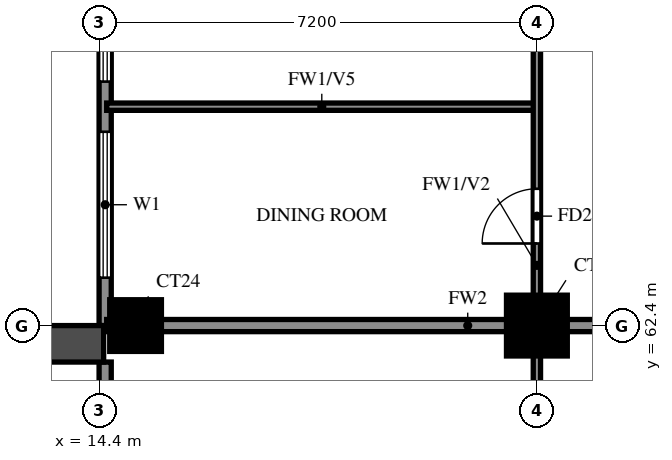
"""IFC4 building model, lengths in metres.
Left out: names, types, materials, properties, quantities, classifications, styles, units other than length and angle.
Written with IfcOpenShell. Run it as: python <this file> out.ifc"""

import sys

from ifc_helpers import new_model, si_unit, direction, frame, frame_2d, origin, origin_2d, place, context, subcontext, project, spatial, rectangle, extrude, source, transform, mapped, element, fill, save


model = new_model("IFC4")
c1 = context("Model", 3, precision=1e-05, world=origin(), true_north=direction((0.0, 1.0)))
c2 = subcontext(c1, "Body", "Model", "MODEL_VIEW")
j1 = project(units=[si_unit("LENGTHUNIT", "METRE"), si_unit("PLANEANGLEUNIT", "RADIAN")], contexts=[c1])
p1 = place(None, origin())
s1 = spatial("IfcSite", under=j1, at=p1, CompositionType="ELEMENT")
p2 = place(p1, origin())
s2 = spatial("IfcBuilding", under=s1, at=p2, CompositionType="ELEMENT")
p3 = place(p2, frame((0.0, 0.0, 143.0)))
s3 = spatial("IfcBuildingStorey", under=s2, at=p3, CompositionType="ELEMENT", Elevation=143.0)
m1 = source(origin(), c2, "Body", "SweptSolid", [
    extrude(rectangle(XDim=0.85, YDim=0.85, at=origin_2d()), origin(), (0.0, 0.0, 1.0), 3.2),
])
p4 = place(p3, frame((15.0, 62.4, 0.0), z_axis=(0.0, 0.0, 1.0), x_axis=(1.0, 0.0, 0.0)))
e1 = element("IfcColumn", 1, at=p4, inside=s3, PredefinedType="COLUMN", context=c2, shape_type="MappedRepresentation", body=[
    mapped(m1, transform((0.0, 0.0, 0.0))),
])
m2 = source(origin(), c2, "Body", "SweptSolid", [
    extrude(rectangle(XDim=1.0, YDim=1.0, at=origin_2d()), origin(), (0.0, 0.0, 1.0), 3.2),
])
p5 = place(p3, frame((21.6, 62.4, 0.0), z_axis=(0.0, 0.0, 1.0), x_axis=(1.0, 0.0, 0.0)))
e2 = element("IfcColumn", 2, at=p5, inside=s3, PredefinedType="COLUMN", context=c2, shape_type="MappedRepresentation", body=[
    mapped(m2, transform((0.0, 0.0, 0.0))),
])
p6 = place(p3, frame((14.5, 76.6, 0.0), z_axis=(0.0, 0.0, 1.0), x_axis=(0.0, -1.0, 0.0)))
e3 = element("IfcWall", 3, at=p6, inside=s3, PredefinedType="SOLIDWALL", context=c2, shape_type="SweptSolid", body=[
    extrude(rectangle(XDim=14.2, YDim=0.2, at=frame_2d((7.1, 0.0))), origin(), (0.0, 0.0, 1.0), 3.2),
])
p7 = place(p6, frame((11.012, 0.0, 0.6)))
e4 = element("IfcOpeningElement", 4, at=p7, cuts=e3, PredefinedType="OPENING", context=c2, shape_type="SweptSolid", body=[
    extrude(rectangle(XDim=2.4, YDim=2.4, at=frame_2d((1.2, 1.2))), frame((0.0, 0.11, 0.0), z_axis=(0.0, -1.0, 0.0), x_axis=(1.0, 0.0, 0.0)), (0.0, 0.0, 1.0), 0.22),
])
p8 = place(p6, frame((7.788, 0.0, 0.6)))
e5 = element("IfcOpeningElement", 5, at=p8, cuts=e3, PredefinedType="OPENING", context=c2, shape_type="SweptSolid", body=[
    extrude(rectangle(XDim=2.4, YDim=2.4, at=frame_2d((1.2, 1.2))), frame((0.0, 0.11, 0.0), z_axis=(0.0, -1.0, 0.0), x_axis=(1.0, 0.0, 0.0)), (0.0, 0.0, 1.0), 0.22),
])
p9 = place(p6, frame((4.562, 0.0, 1.5)))
e6 = element("IfcOpeningElement", 6, at=p9, cuts=e3, PredefinedType="OPENING", context=c2, shape_type="SweptSolid", body=[
    extrude(rectangle(XDim=0.9, YDim=0.9, at=frame_2d((0.45, 0.45))), frame((0.0, 0.11, 0.0), z_axis=(0.0, -1.0, 0.0), x_axis=(1.0, 0.0, 0.0)), (0.0, 0.0, 1.0), 0.22),
])
p10 = place(p6, frame((0.6, 0.0, 0.6)))
e7 = element("IfcOpeningElement", 7, at=p10, cuts=e3, PredefinedType="OPENING", context=c2, shape_type="SweptSolid", body=[
    extrude(rectangle(XDim=2.4, YDim=2.4, at=frame_2d((1.2, 1.2))), frame((0.0, 0.11, 0.0), z_axis=(0.0, -1.0, 0.0), x_axis=(1.0, 0.0, 0.0)), (0.0, 0.0, 1.0), 0.22),
])
p11 = place(p3, frame((14.5, 61.8, 0.0), z_axis=(0.0, 0.0, 1.0), x_axis=(0.0, -1.0, 0.0)))
e8 = element("IfcWall", 8, at=p11, inside=s3, PredefinedType="SOLIDWALL", context=c2, shape_type="SweptSolid", body=[
    extrude(rectangle(XDim=6.0, YDim=0.2, at=frame_2d((3.0, 0.0))), origin(), (0.0, 0.0, 1.0), 3.2),
])
p12 = place(p11, frame((0.9, 0.0, 0.0)))
e9 = element("IfcOpeningElement", 9, at=p12, cuts=e8, PredefinedType="OPENING", context=c2, shape_type="SweptSolid", body=[
    extrude(rectangle(XDim=1.8, YDim=2.4, at=frame_2d((0.9, 1.2))), frame((0.0, 0.11, 0.0), z_axis=(0.0, -1.0, 0.0), x_axis=(1.0, 0.0, 0.0)), (0.0, 0.0, 1.0), 0.22),
])
p13 = place(p11, frame((3.95, 0.0, 1.5)))
e10 = element("IfcOpeningElement", 10, at=p13, cuts=e8, PredefinedType="OPENING", context=c2, shape_type="SweptSolid", body=[
    extrude(rectangle(XDim=0.9, YDim=0.9, at=frame_2d((0.45, 0.45))), frame((0.0, 0.11, 0.0), z_axis=(0.0, -1.0, 0.0), x_axis=(1.0, 0.0, 0.0)), (0.0, 0.0, 1.0), 0.22),
])
p14 = place(p3, frame((14.475, 62.1, 0.0), z_axis=(0.0, 0.0, 1.0), x_axis=(-1.0, 0.0, 0.0)))
e11 = element("IfcWall", 11, at=p14, inside=s3, PredefinedType="SOLIDWALL", context=c2, shape_type="SweptSolid", body=[
    extrude(rectangle(XDim=2.775, YDim=0.6, at=frame_2d((1.388, 0.0))), origin(), (0.0, 0.0, 1.0), 2.85),
])
p15 = place(p3, frame((14.525, 62.4, 0.0), z_axis=(0.0, 0.0, 1.0), x_axis=(1.0, 0.0, 0.0)))
e12 = element("IfcWall", 12, at=p15, inside=s3, PredefinedType="SOLIDWALL", context=c2, shape_type="SweptSolid", body=[
    extrude(rectangle(XDim=11.875, YDim=0.2, at=frame_2d((5.938, 0.0))), origin(), (0.0, 0.0, 1.0), 3.2),
])
p16 = place(p3, frame((14.525, 66.0, 0.0), z_axis=(0.0, 0.0, 1.0), x_axis=(1.0, 0.0, 0.0)))
e13 = element("IfcWall", 13, at=p16, inside=s3, PredefinedType="PARTITIONING", context=c2, shape_type="SweptSolid", body=[
    extrude(rectangle(XDim=7.075, YDim=0.12, at=frame_2d((3.538, 0.0))), origin(), (0.0, 0.0, 1.0), 2.3),
])
p17 = place(p3, frame((21.6, 58.8, 0.0), z_axis=(0.0, 0.0, 1.0), x_axis=(0.0, 1.0, 0.0)))
e14 = element("IfcWall", 14, at=p17, inside=s3, PredefinedType="PARTITIONING", context=c2, shape_type="SweptSolid", body=[
    extrude(rectangle(XDim=10.8, YDim=0.12, at=frame_2d((5.4, 0.0))), origin(), (0.0, 0.0, 1.0), 3.2),
])
p18 = place(p17, frame((1.35, 0.0, 0.0)))
e15 = element("IfcOpeningElement", 15, at=p18, cuts=e14, PredefinedType="OPENING", context=c2, shape_type="SweptSolid", body=[
    extrude(rectangle(XDim=0.9, YDim=2.1, at=frame_2d((0.45, 1.05))), frame((0.0, 0.07, 0.0), z_axis=(0.0, -1.0, 0.0), x_axis=(1.0, 0.0, 0.0)), (0.0, 0.0, 1.0), 0.14),
])
p19 = place(p17, frame((4.95, 0.0, 0.0)))
e16 = element("IfcOpeningElement", 16, at=p19, cuts=e14, PredefinedType="OPENING", context=c2, shape_type="SweptSolid", body=[
    extrude(rectangle(XDim=0.9, YDim=2.1, at=frame_2d((0.45, 1.05))), frame((0.0, 0.07, 0.0), z_axis=(0.0, -1.0, 0.0), x_axis=(1.0, 0.0, 0.0)), (0.0, 0.0, 1.0), 0.14),
])
p20 = place(p17, frame((8.55, 0.0, 0.0)))
e17 = element("IfcOpeningElement", 17, at=p20, cuts=e14, PredefinedType="OPENING", context=c2, shape_type="SweptSolid", body=[
    extrude(rectangle(XDim=0.9, YDim=2.1, at=frame_2d((0.45, 1.05))), frame((0.0, 0.07, 0.0), z_axis=(0.0, -1.0, 0.0), x_axis=(1.0, 0.0, 0.0)), (0.0, 0.0, 1.0), 0.14),
])
p21 = place(p7, origin())
e18 = element("IfcWindow", 18, at=p21, inside=s3, PartitioningType="DOUBLE_PANEL_VERTICAL", PredefinedType="WINDOW", context=c2, shape_type="SweptSolid", body=[
    extrude(rectangle(XDim=2.4, YDim=2.4, at=frame_2d((1.2, 1.2))), frame((0.0, 0.03, 0.0), z_axis=(0.0, -1.0, 0.0), x_axis=(1.0, 0.0, 0.0)), (0.0, 0.0, 1.0), 0.06),
])
fill(e4, e18)
p22 = place(p8, origin())
e19 = element("IfcWindow", 19, at=p22, inside=s3, PartitioningType="DOUBLE_PANEL_VERTICAL", PredefinedType="WINDOW", context=c2, shape_type="SweptSolid", body=[
    extrude(rectangle(XDim=2.4, YDim=2.4, at=frame_2d((1.2, 1.2))), frame((0.0, 0.03, 0.0), z_axis=(0.0, -1.0, 0.0), x_axis=(1.0, 0.0, 0.0)), (0.0, 0.0, 1.0), 0.06),
])
fill(e5, e19)
p23 = place(p19, origin())
e20 = element("IfcDoor", 20, at=p23, inside=s3, OperationType="SINGLE_SWING_RIGHT", PredefinedType="DOOR", context=c2, shape_type="SweptSolid", body=[
    extrude(rectangle(XDim=0.9, YDim=2.1, at=frame_2d((0.45, 1.05))), frame((0.0, 0.025, 0.0), z_axis=(0.0, -1.0, 0.0), x_axis=(1.0, 0.0, 0.0)), (0.0, 0.0, 1.0), 0.05),
])
fill(e16, e20)
save(model, sys.argv[1])
